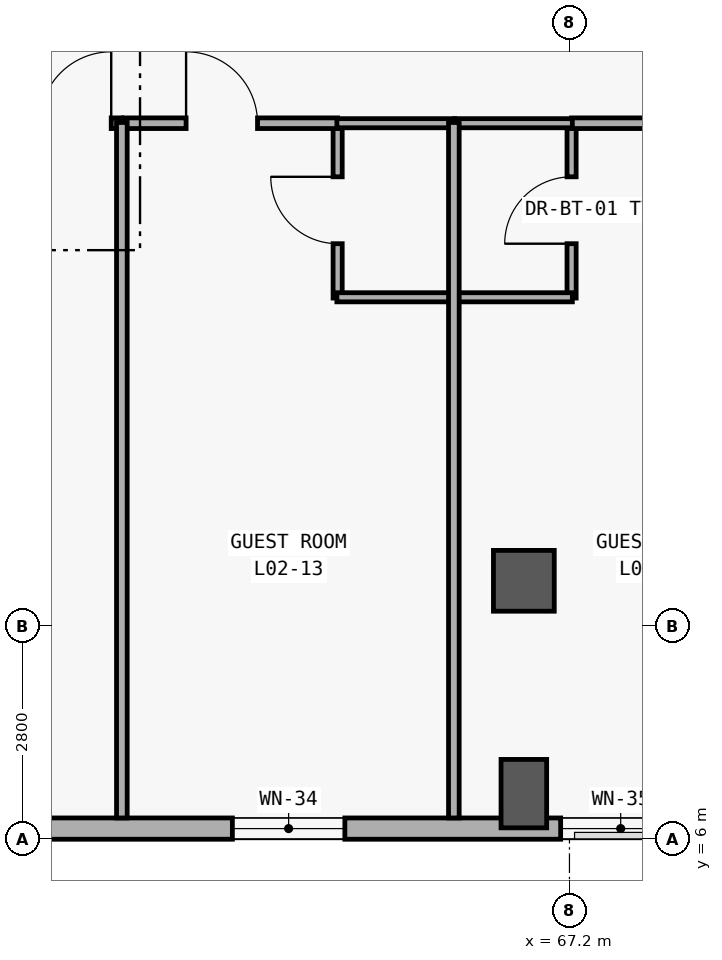
"""IFC4 building model, lengths in metres.
Left out: names, types, materials, properties, quantities, classifications, styles, units other than length and angle.
Written with IfcOpenShell. Run it as: python <this file> out.ifc"""

import sys

from ifc_helpers import new_model, si_unit, direction, frame, frame_2d, origin, origin_2d, place, context, subcontext, project, spatial, rectangle, extrude, element, fill, save


model = new_model("IFC4")
c1 = context("Model", 3, precision=1e-05, world=origin(), true_north=direction((0.0, 1.0)))
c2 = subcontext(c1, "Body", "Model", "MODEL_VIEW")
j1 = project(units=[si_unit("LENGTHUNIT", "METRE"), si_unit("PLANEANGLEUNIT", "RADIAN")], contexts=[c1])
p1 = place(None, origin())
s1 = spatial("IfcSite", under=j1, at=p1, CompositionType="ELEMENT")
p2 = place(p1, origin())
s2 = spatial("IfcBuilding", under=s1, at=p2, CompositionType="ELEMENT")
p3 = place(p2, frame((0.0, 0.0, 10.8)))
s3 = spatial("IfcBuildingStorey", under=s2, at=p3, CompositionType="ELEMENT", Elevation=10.8)
p4 = place(p3, frame((66.6, 6.6, 0.0), z_axis=(0.0, 0.0, 1.0), x_axis=(0.0, 1.0, 0.0)))
e1 = element("IfcColumn", 1, at=p4, inside=s3, PredefinedType="COLUMN", context=c2, shape_type="SweptSolid", body=[
    extrude(rectangle(XDim=0.6, YDim=0.9, at=origin_2d()), origin(), (0.0, 0.0, 1.0), 4.2),
])
p5 = place(p3, frame((66.6, 9.4, 0.0), z_axis=(0.0, 0.0, 1.0), x_axis=(1.0, 0.0, 0.0)))
e2 = element("IfcColumn", 2, at=p5, inside=s3, PredefinedType="COLUMN", context=c2, shape_type="SweptSolid", body=[
    extrude(rectangle(XDim=0.8, YDim=0.8, at=origin_2d()), origin(), (0.0, 0.0, 1.0), 4.2),
])
p6 = place(p3, frame((92.12, 6.14, 0.0), z_axis=(0.0, 0.0, 1.0), x_axis=(-1.0, 0.0, 0.0)))
e3 = element("IfcWall", 3, at=p6, inside=s3, PredefinedType="SOLIDWALL", context=c2, shape_type="SweptSolid", body=[
    extrude(rectangle(XDim=83.44, YDim=0.28, at=frame_2d((41.72, 0.0))), origin(), (0.0, 0.0, 1.0), 3.92),
])
p7 = place(p6, frame((79.486, 0.0, 0.85)))
e4 = element("IfcOpeningElement", 4, at=p7, cuts=e3, PredefinedType="OPENING", context=c2, shape_type="SweptSolid", body=[
    extrude(rectangle(XDim=3.1, YDim=2.2, at=frame_2d((1.55, 1.1))), frame((0.0, 0.15, 0.0), z_axis=(0.0, -1.0, 0.0), x_axis=(1.0, 0.0, 0.0)), (0.0, 0.0, 1.0), 0.3),
])
p8 = place(p6, frame((76.043, 0.0, 0.85)))
e5 = element("IfcOpeningElement", 5, at=p8, cuts=e3, PredefinedType="OPENING", context=c2, shape_type="SweptSolid", body=[
    extrude(rectangle(XDim=1.25, YDim=1.45, at=frame_2d((0.625, 0.725))), frame((0.0, 0.15, 0.0), z_axis=(0.0, -1.0, 0.0), x_axis=(1.0, 0.0, 0.0)), (0.0, 0.0, 1.0), 0.3),
])
p9 = place(p6, frame((71.624, 0.0, 0.85)))
e6 = element("IfcOpeningElement", 6, at=p9, cuts=e3, PredefinedType="OPENING", context=c2, shape_type="SweptSolid", body=[
    extrude(rectangle(XDim=1.35, YDim=1.55, at=frame_2d((0.675, 0.775))), frame((0.0, 0.15, 0.0), z_axis=(0.0, -1.0, 0.0), x_axis=(1.0, 0.0, 0.0)), (0.0, 0.0, 1.0), 0.3),
])
p10 = place(p6, frame((67.206, 0.0, 0.85)))
e7 = element("IfcOpeningElement", 7, at=p10, cuts=e3, PredefinedType="OPENING", context=c2, shape_type="SweptSolid", body=[
    extrude(rectangle(XDim=1.45, YDim=1.65, at=frame_2d((0.725, 0.825))), frame((0.0, 0.15, 0.0), z_axis=(0.0, -1.0, 0.0), x_axis=(1.0, 0.0, 0.0)), (0.0, 0.0, 1.0), 0.3),
])
p11 = place(p6, frame((62.787, 0.0, 0.85)))
e8 = element("IfcOpeningElement", 8, at=p11, cuts=e3, PredefinedType="OPENING", context=c2, shape_type="SweptSolid", body=[
    extrude(rectangle(XDim=1.55, YDim=1.65, at=frame_2d((0.775, 0.825))), frame((0.0, 0.15, 0.0), z_axis=(0.0, -1.0, 0.0), x_axis=(1.0, 0.0, 0.0)), (0.0, 0.0, 1.0), 0.3),
])
p12 = place(p6, frame((58.344, 0.0, 0.85)))
e9 = element("IfcOpeningElement", 9, at=p12, cuts=e3, PredefinedType="OPENING", context=c2, shape_type="SweptSolid", body=[
    extrude(rectangle(XDim=1.7, YDim=2.0, at=frame_2d((0.85, 1.0))), frame((0.0, 0.15, 0.0), z_axis=(0.0, -1.0, 0.0), x_axis=(1.0, 0.0, 0.0)), (0.0, 0.0, 1.0), 0.3),
])
p13 = place(p6, frame((53.675, 0.0, 0.85)))
e10 = element("IfcOpeningElement", 10, at=p13, cuts=e3, PredefinedType="OPENING", context=c2, shape_type="SweptSolid", body=[
    extrude(rectangle(XDim=2.3, YDim=2.05, at=frame_2d((1.15, 1.025))), frame((0.0, 0.15, 0.0), z_axis=(0.0, -1.0, 0.0), x_axis=(1.0, 0.0, 0.0)), (0.0, 0.0, 1.0), 0.3),
])
p14 = place(p6, frame((49.082, 0.0, 0.85)))
e11 = element("IfcOpeningElement", 11, at=p14, cuts=e3, PredefinedType="OPENING", context=c2, shape_type="SweptSolid", body=[
    extrude(rectangle(XDim=2.75, YDim=2.1, at=frame_2d((1.375, 1.05))), frame((0.0, 0.15, 0.0), z_axis=(0.0, -1.0, 0.0), x_axis=(1.0, 0.0, 0.0)), (0.0, 0.0, 1.0), 0.3),
])
p15 = place(p6, frame((44.439, 0.0, 0.85)))
e12 = element("IfcOpeningElement", 12, at=p15, cuts=e3, PredefinedType="OPENING", context=c2, shape_type="SweptSolid", body=[
    extrude(rectangle(XDim=3.3, YDim=2.15, at=frame_2d((1.65, 1.075))), frame((0.0, 0.15, 0.0), z_axis=(0.0, -1.0, 0.0), x_axis=(1.0, 0.0, 0.0)), (0.0, 0.0, 1.0), 0.3),
])
p16 = place(p6, frame((41.13, 0.0, 0.85)))
e13 = element("IfcOpeningElement", 13, at=p16, cuts=e3, PredefinedType="OPENING", context=c2, shape_type="SweptSolid", body=[
    extrude(rectangle(XDim=1.18, YDim=1.5, at=frame_2d((0.59, 0.75))), frame((0.0, 0.15, 0.0), z_axis=(0.0, -1.0, 0.0), x_axis=(1.0, 0.0, 0.0)), (0.0, 0.0, 1.0), 0.3),
])
p17 = place(p6, frame((36.712, 0.0, 0.85)))
e14 = element("IfcOpeningElement", 14, at=p17, cuts=e3, PredefinedType="OPENING", context=c2, shape_type="SweptSolid", body=[
    extrude(rectangle(XDim=1.28, YDim=1.6, at=frame_2d((0.64, 0.8))), frame((0.0, 0.15, 0.0), z_axis=(0.0, -1.0, 0.0), x_axis=(1.0, 0.0, 0.0)), (0.0, 0.0, 1.0), 0.3),
])
p18 = place(p6, frame((32.293, 0.0, 0.85)))
e15 = element("IfcOpeningElement", 15, at=p18, cuts=e3, PredefinedType="OPENING", context=c2, shape_type="SweptSolid", body=[
    extrude(rectangle(XDim=1.38, YDim=1.7, at=frame_2d((0.69, 0.85))), frame((0.0, 0.15, 0.0), z_axis=(0.0, -1.0, 0.0), x_axis=(1.0, 0.0, 0.0)), (0.0, 0.0, 1.0), 0.3),
])
p19 = place(p6, frame((27.875, 0.0, 0.85)))
e16 = element("IfcOpeningElement", 16, at=p19, cuts=e3, PredefinedType="OPENING", context=c2, shape_type="SweptSolid", body=[
    extrude(rectangle(XDim=1.48, YDim=1.8, at=frame_2d((0.74, 0.9))), frame((0.0, 0.15, 0.0), z_axis=(0.0, -1.0, 0.0), x_axis=(1.0, 0.0, 0.0)), (0.0, 0.0, 1.0), 0.3),
])
p20 = place(p6, frame((23.456, 0.0, 0.85)))
e17 = element("IfcOpeningElement", 17, at=p20, cuts=e3, PredefinedType="OPENING", context=c2, shape_type="SweptSolid", body=[
    extrude(rectangle(XDim=1.58, YDim=1.85, at=frame_2d((0.79, 0.925))), frame((0.0, 0.15, 0.0), z_axis=(0.0, -1.0, 0.0), x_axis=(1.0, 0.0, 0.0)), (0.0, 0.0, 1.0), 0.3),
])
p21 = place(p6, frame((19.038, 0.0, 0.85)))
e18 = element("IfcOpeningElement", 18, at=p21, cuts=e3, PredefinedType="OPENING", context=c2, shape_type="SweptSolid", body=[
    extrude(rectangle(XDim=1.68, YDim=1.9, at=frame_2d((0.84, 0.95))), frame((0.0, 0.15, 0.0), z_axis=(0.0, -1.0, 0.0), x_axis=(1.0, 0.0, 0.0)), (0.0, 0.0, 1.0), 0.3),
])
p22 = place(p6, frame((14.62, 0.0, 0.85)))
e19 = element("IfcOpeningElement", 19, at=p22, cuts=e3, PredefinedType="OPENING", context=c2, shape_type="SweptSolid", body=[
    extrude(rectangle(XDim=1.78, YDim=1.95, at=frame_2d((0.89, 0.975))), frame((0.0, 0.15, 0.0), z_axis=(0.0, -1.0, 0.0), x_axis=(1.0, 0.0, 0.0)), (0.0, 0.0, 1.0), 0.3),
])
p23 = place(p6, frame((10.201, 0.0, 0.85)))
e20 = element("IfcOpeningElement", 20, at=p23, cuts=e3, PredefinedType="OPENING", context=c2, shape_type="SweptSolid", body=[
    extrude(rectangle(XDim=1.88, YDim=1.95, at=frame_2d((0.94, 0.975))), frame((0.0, 0.15, 0.0), z_axis=(0.0, -1.0, 0.0), x_axis=(1.0, 0.0, 0.0)), (0.0, 0.0, 1.0), 0.3),
])
p24 = place(p6, frame((5.748, 0.0, 0.85)))
e21 = element("IfcOpeningElement", 21, at=p24, cuts=e3, PredefinedType="OPENING", context=c2, shape_type="SweptSolid", body=[
    extrude(rectangle(XDim=2.05, YDim=1.95, at=frame_2d((1.025, 0.975))), frame((0.0, 0.15, 0.0), z_axis=(0.0, -1.0, 0.0), x_axis=(1.0, 0.0, 0.0)), (0.0, 0.0, 1.0), 0.3),
])
p25 = place(p6, frame((1.314, 0.0, 0.85)))
e22 = element("IfcOpeningElement", 22, at=p25, cuts=e3, PredefinedType="OPENING", context=c2, shape_type="SweptSolid", body=[
    extrude(rectangle(XDim=2.18, YDim=1.95, at=frame_2d((1.09, 0.975))), frame((0.0, 0.15, 0.0), z_axis=(0.0, -1.0, 0.0), x_axis=(1.0, 0.0, 0.0)), (0.0, 0.0, 1.0), 0.3),
])
p26 = place(p3, frame((64.15, 13.12, 0.0), z_axis=(0.0, 0.0, 1.0), x_axis=(0.0, 1.0, 0.0)))
e23 = element("IfcWall", 23, at=p26, inside=s3, PredefinedType="PARTITIONING", context=c2, shape_type="SweptSolid", body=[
    extrude(rectangle(XDim=2.31, YDim=0.12, at=frame_2d((1.155, 0.0))), origin(), (0.0, 0.0, 1.0), 3.02),
])
p27 = place(p26, frame((0.715, 0.0, 0.0)))
e24 = element("IfcOpeningElement", 24, at=p27, cuts=e23, PredefinedType="OPENING", context=c2, shape_type="SweptSolid", body=[
    extrude(rectangle(XDim=0.88, YDim=2.15, at=frame_2d((0.44, 1.075))), frame((0.0, 0.07, 0.0), z_axis=(0.0, -1.0, 0.0), x_axis=(1.0, 0.0, 0.0)), (0.0, 0.0, 1.0), 0.14),
])
p28 = place(p3, frame((67.228, 13.12, 0.0), z_axis=(0.0, 0.0, 1.0), x_axis=(0.0, 1.0, 0.0)))
e25 = element("IfcWall", 25, at=p28, inside=s3, PredefinedType="PARTITIONING", context=c2, shape_type="SweptSolid", body=[
    extrude(rectangle(XDim=2.31, YDim=0.12, at=frame_2d((1.155, 0.0))), origin(), (0.0, 0.0, 1.0), 3.02),
])
p29 = place(p28, frame((0.715, 0.0, 0.0)))
e26 = element("IfcOpeningElement", 26, at=p29, cuts=e25, PredefinedType="OPENING", context=c2, shape_type="SweptSolid", body=[
    extrude(rectangle(XDim=0.88, YDim=2.15, at=frame_2d((0.44, 1.075))), frame((0.0, 0.07, 0.0), z_axis=(0.0, -1.0, 0.0), x_axis=(1.0, 0.0, 0.0)), (0.0, 0.0, 1.0), 0.14),
])
p30 = place(p3, frame((58.492, 15.42, 0.0), z_axis=(0.0, 0.0, 1.0), x_axis=(1.0, 0.0, 0.0)))
e27 = element("IfcWall", 27, at=p30, inside=s3, PredefinedType="PARTITIONING", context=c2, shape_type="SweptSolid", body=[
    extrude(rectangle(XDim=2.819, YDim=0.14, at=frame_2d((1.41, 0.0))), origin(), (0.0, 0.0, 1.0), 3.02),
])
p31 = place(p30, frame((1.739, 0.0, 0.0)))
e28 = element("IfcOpeningElement", 28, at=p31, cuts=e27, PredefinedType="OPENING", context=c2, shape_type="SweptSolid", body=[
    extrude(rectangle(XDim=0.94, YDim=2.2, at=frame_2d((0.47, 1.1))), frame((0.0, 0.08, 0.0), z_axis=(0.0, -1.0, 0.0), x_axis=(1.0, 0.0, 0.0)), (0.0, 0.0, 1.0), 0.16),
])
p32 = place(p3, frame((61.331, 15.42, 0.0), z_axis=(0.0, 0.0, 1.0), x_axis=(1.0, 0.0, 0.0)))
e29 = element("IfcWall", 29, at=p32, inside=s3, PredefinedType="PARTITIONING", context=c2, shape_type="SweptSolid", body=[
    extrude(rectangle(XDim=2.819, YDim=0.14, at=frame_2d((1.409, 0.0))), origin(), (0.0, 0.0, 1.0), 3.02),
])
p33 = place(p32, frame((0.825, 0.0, 0.0)))
e30 = element("IfcOpeningElement", 30, at=p33, cuts=e29, PredefinedType="OPENING", context=c2, shape_type="SweptSolid", body=[
    extrude(rectangle(XDim=0.94, YDim=2.2, at=frame_2d((0.47, 1.1))), frame((0.0, 0.08, 0.0), z_axis=(0.0, -1.0, 0.0), x_axis=(1.0, 0.0, 0.0)), (0.0, 0.0, 1.0), 0.16),
])
p34 = place(p3, frame((67.228, 15.42, 0.0), z_axis=(0.0, 0.0, 1.0), x_axis=(1.0, 0.0, 0.0)))
e31 = element("IfcWall", 31, at=p34, inside=s3, PredefinedType="PARTITIONING", context=c2, shape_type="SweptSolid", body=[
    extrude(rectangle(XDim=2.82, YDim=0.14, at=frame_2d((1.41, 0.0))), origin(), (0.0, 0.0, 1.0), 3.02),
])
p35 = place(p34, frame((1.74, 0.0, 0.0)))
e32 = element("IfcOpeningElement", 32, at=p35, cuts=e31, PredefinedType="OPENING", context=c2, shape_type="SweptSolid", body=[
    extrude(rectangle(XDim=0.94, YDim=2.2, at=frame_2d((0.47, 1.1))), frame((0.0, 0.08, 0.0), z_axis=(0.0, -1.0, 0.0), x_axis=(1.0, 0.0, 0.0)), (0.0, 0.0, 1.0), 0.16),
])
for number, where, z_axis, x_axis in (
    (33, (64.14, 13.13, 0.0), (0.0, 0.0, 1.0), (1.0, 0.0, 0.0)),
    (34, (64.14, 15.42, 0.0), (0.0, 0.0, 1.0), (1.0, 0.0, 0.0)),
    (35, (65.689, 13.13, 0.0), (0.0, 0.0, 1.0), (1.0, 0.0, 0.0)),
    (36, (65.689, 15.42, 0.0), (0.0, 0.0, 1.0), (1.0, 0.0, 0.0)),
):
    element("IfcWall", number, at=place(p3, frame(where, z_axis=z_axis, x_axis=x_axis)), inside=s3, PredefinedType="PARTITIONING", context=c2, shape_type="SweptSolid", body=[
        extrude(rectangle(XDim=1.549, YDim=0.12, at=frame_2d((0.774, 0.0))), origin(), (0.0, 0.0, 1.0), 3.02),
    ])
for number, where, z_axis, x_axis in (
    (37, (61.311, 6.28, 0.0), (0.0, 0.0, 1.0), (0.0, 1.0, 0.0)),
    (38, (65.679, 6.28, 0.0), (0.0, 0.0, 1.0), (0.0, 1.0, 0.0)),
):
    element("IfcWall", number, at=place(p3, frame(where, z_axis=z_axis, x_axis=x_axis)), inside=s3, PredefinedType="PARTITIONING", context=c2, shape_type="SweptSolid", body=[
        extrude(rectangle(XDim=9.15, YDim=0.14, at=frame_2d((4.575, 0.0))), origin(), (0.0, 0.0, 1.0), 3.02),
    ])
p36 = place(p19, origin())
e39 = element("IfcWindow", 39, at=p36, inside=s3, PartitioningType="SINGLE_PANEL", PredefinedType="WINDOW", context=c2, shape_type="SweptSolid", body=[
    extrude(rectangle(XDim=1.48, YDim=1.8, at=frame_2d((0.74, 0.9))), frame((0.0, 0.03, 0.0), z_axis=(0.0, -1.0, 0.0), x_axis=(1.0, 0.0, 0.0)), (0.0, 0.0, 1.0), 0.06),
])
fill(e16, e39)
p37 = place(p20, origin())
e40 = element("IfcWindow", 40, at=p37, inside=s3, PartitioningType="SINGLE_PANEL", PredefinedType="WINDOW", context=c2, shape_type="SweptSolid", body=[
    extrude(rectangle(XDim=1.58, YDim=1.85, at=frame_2d((0.79, 0.925))), frame((0.0, 0.03, 0.0), z_axis=(0.0, -1.0, 0.0), x_axis=(1.0, 0.0, 0.0)), (0.0, 0.0, 1.0), 0.06),
])
fill(e17, e40)
p38 = place(p27, origin())
e41 = element("IfcDoor", 41, at=p38, inside=s3, OperationType="SINGLE_SWING_RIGHT", PredefinedType="DOOR", context=c2, shape_type="SweptSolid", body=[
    extrude(rectangle(XDim=0.88, YDim=2.15, at=frame_2d((0.44, 1.075))), frame((0.0, 0.025, 0.0), z_axis=(0.0, -1.0, 0.0), x_axis=(1.0, 0.0, 0.0)), (0.0, 0.0, 1.0), 0.05),
])
fill(e24, e41)
p39 = place(p29, origin())
e42 = element("IfcDoor", 42, at=p39, inside=s3, OperationType="SINGLE_SWING_LEFT", PredefinedType="DOOR", context=c2, shape_type="SweptSolid", body=[
    extrude(rectangle(XDim=0.88, YDim=2.15, at=frame_2d((0.44, 1.075))), frame((0.0, 0.025, 0.0), z_axis=(0.0, -1.0, 0.0), x_axis=(1.0, 0.0, 0.0)), (0.0, 0.0, 1.0), 0.05),
])
fill(e26, e42)
p40 = place(p31, origin())
e43 = element("IfcDoor", 43, at=p40, inside=s3, OperationType="SINGLE_SWING_RIGHT", PredefinedType="DOOR", context=c2, shape_type="SweptSolid", body=[
    extrude(rectangle(XDim=0.94, YDim=2.2, at=frame_2d((0.47, 1.1))), frame((0.0, 0.025, 0.0), z_axis=(0.0, -1.0, 0.0), x_axis=(1.0, 0.0, 0.0)), (0.0, 0.0, 1.0), 0.05),
])
fill(e28, e43)
p41 = place(p33, origin())
e44 = element("IfcDoor", 44, at=p41, inside=s3, OperationType="SINGLE_SWING_LEFT", PredefinedType="DOOR", context=c2, shape_type="SweptSolid", body=[
    extrude(rectangle(XDim=0.94, YDim=2.2, at=frame_2d((0.47, 1.1))), frame((0.0, 0.025, 0.0), z_axis=(0.0, -1.0, 0.0), x_axis=(1.0, 0.0, 0.0)), (0.0, 0.0, 1.0), 0.05),
])
fill(e30, e44)
save(model, sys.argv[1])
